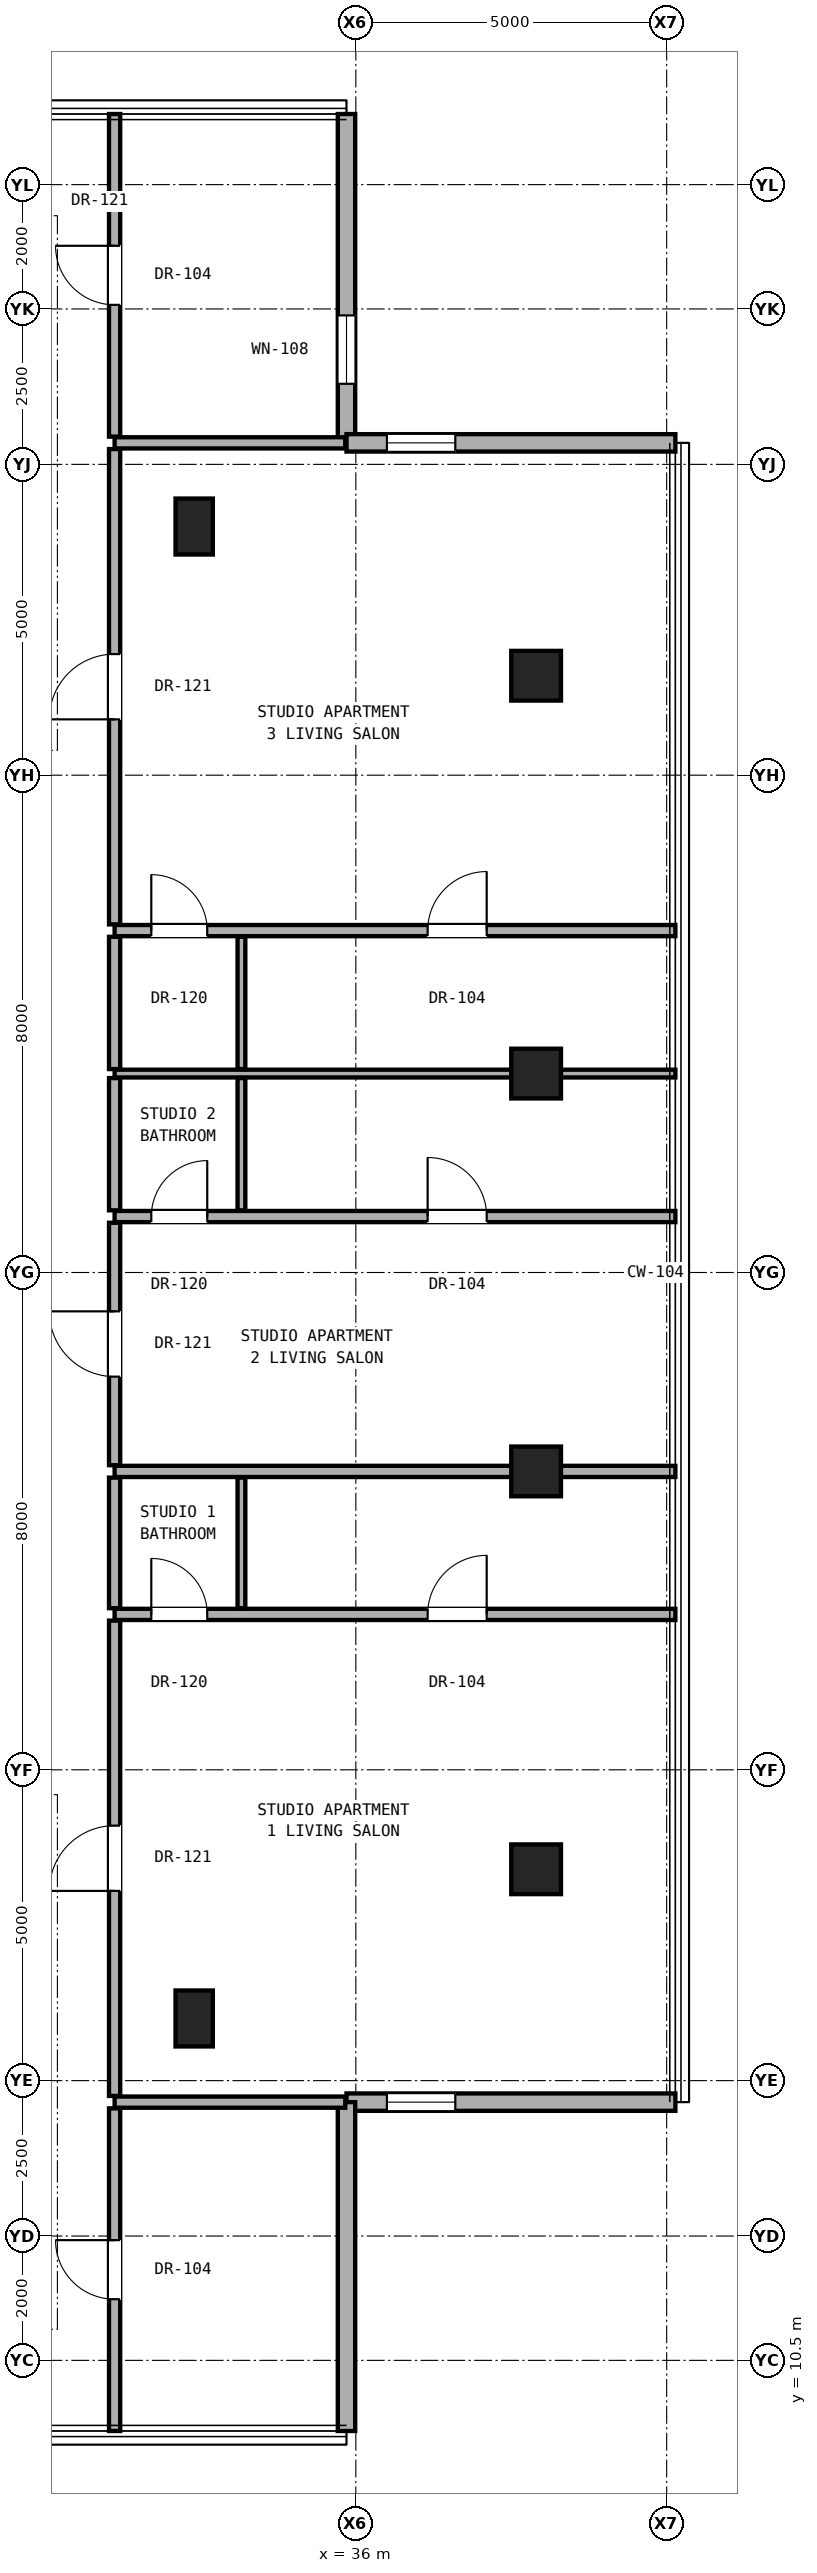
"""IFC4 building model, lengths in metres.
Left out: names, types, materials, properties, quantities, classifications, styles, units other than length and angle.
Written with IfcOpenShell. Run it as: python <this file> out.ifc"""

import sys

from ifc_helpers import new_model, si_unit, direction, frame, frame_2d, origin, origin_2d, place, context, subcontext, project, spatial, rectangle, hollow_rectangle, extrude, element, fill, save


model = new_model("IFC4")
c1 = context("Model", 3, precision=1e-05, world=origin(), true_north=direction((0.0, 1.0)))
c2 = subcontext(c1, "Body", "Model", "MODEL_VIEW")
j1 = project(units=[si_unit("LENGTHUNIT", "METRE"), si_unit("PLANEANGLEUNIT", "RADIAN")], contexts=[c1])
p1 = place(None, origin())
s1 = spatial("IfcSite", under=j1, at=p1, CompositionType="ELEMENT")
p2 = place(p1, origin())
s2 = spatial("IfcBuilding", under=s1, at=p2, CompositionType="ELEMENT")
p3 = place(p2, frame((0.0, 0.0, 226.0)))
s3 = spatial("IfcBuildingStorey", under=s2, at=p3, CompositionType="ELEMENT", Elevation=226.0)
for number, where, z_axis, x_axis in (
    (1, (38.9, 18.4, 0.0), (0.0, 0.0, 1.0), (1.0, 0.0, 0.0)),
    (2, (38.9, 24.8, 0.0), (0.0, 0.0, 1.0), (1.0, 0.0, 0.0)),
    (3, (38.9, 31.2, 0.0), (0.0, 0.0, 1.0), (1.0, 0.0, 0.0)),
    (4, (38.9, 37.6, 0.0), (0.0, 0.0, 1.0), (1.0, 0.0, 0.0)),
):
    element("IfcColumn", number, at=place(p3, frame(where, z_axis=z_axis, x_axis=x_axis)), inside=s3, PredefinedType="COLUMN", context=c2, shape_type="SweptSolid", body=[
        extrude(hollow_rectangle(XDim=0.8, YDim=0.8, WallThickness=0.045, at=origin_2d()), origin(), (0.0, 0.0, 1.0), 3.3),
    ])
for number, where, z_axis, x_axis in (
    (5, (33.4, 16.0, 0.0), (0.0, 0.0, 1.0), (1.0, 0.0, 0.0)),
    (6, (33.4, 40.0, 0.0), (0.0, 0.0, 1.0), (1.0, 0.0, 0.0)),
):
    element("IfcColumn", number, at=place(p3, frame(where, z_axis=z_axis, x_axis=x_axis)), inside=s3, PredefinedType="PILASTER", context=c2, shape_type="SweptSolid", body=[
        extrude(rectangle(XDim=0.6, YDim=0.9, at=origin_2d()), origin(), (0.0, 0.0, 1.0), 3.3),
    ])
p4 = place(p3, frame((35.85, 41.346, 0.0), z_axis=(0.0, 0.0, 1.0), x_axis=(0.0, 1.0, 0.0)))
e7 = element("IfcWall", 7, at=p4, inside=s3, PredefinedType="SOLIDWALL", context=c2, shape_type="SweptSolid", body=[
    extrude(rectangle(XDim=5.29, YDim=0.28, at=frame_2d((2.645, 0.0))), origin(), (0.0, 0.0, 1.0), 3.08),
])
p5 = place(p4, frame((0.95, 0.0, 0.85)))
e8 = element("IfcOpeningElement", 8, at=p5, cuts=e7, PredefinedType="OPENING", context=c2, shape_type="SweptSolid", body=[
    extrude(rectangle(XDim=1.1, YDim=2.0, at=frame_2d((0.55, 1.0))), frame((0.0, 0.15, 0.0), z_axis=(0.0, -1.0, 0.0), x_axis=(1.0, 0.0, 0.0)), (0.0, 0.0, 1.0), 0.3),
])
p6 = place(p3, frame((35.85, 14.654, 0.0), z_axis=(0.0, 0.0, 1.0), x_axis=(1.0, 0.0, 0.0)))
e9 = element("IfcWall", 9, at=p6, inside=s3, PredefinedType="SOLIDWALL", context=c2, shape_type="SweptSolid", body=[
    extrude(rectangle(XDim=5.29, YDim=0.28, at=frame_2d((2.645, 0.0))), origin(), (0.0, 0.0, 1.0), 3.08),
])
p7 = place(p6, frame((0.65, 0.0, 0.85)))
e10 = element("IfcOpeningElement", 10, at=p7, cuts=e9, PredefinedType="OPENING", context=c2, shape_type="SweptSolid", body=[
    extrude(rectangle(XDim=1.1, YDim=2.0, at=frame_2d((0.55, 1.0))), frame((0.0, 0.15, 0.0), z_axis=(0.0, -1.0, 0.0), x_axis=(1.0, 0.0, 0.0)), (0.0, 0.0, 1.0), 0.3),
])
p8 = place(p3, frame((35.85, 9.364, 0.0), z_axis=(0.0, 0.0, 1.0), x_axis=(0.0, 1.0, 0.0)))
e11 = element("IfcWall", 11, at=p8, inside=s3, PredefinedType="SOLIDWALL", context=c2, shape_type="SweptSolid", body=[
    extrude(rectangle(XDim=5.29, YDim=0.28, at=frame_2d((2.645, 0.0))), origin(), (0.0, 0.0, 1.0), 3.08),
])
p9 = place(p3, frame((41.14, 41.346, 0.0), z_axis=(0.0, 0.0, 1.0), x_axis=(-1.0, 0.0, 0.0)))
e12 = element("IfcWall", 12, at=p9, inside=s3, PredefinedType="SOLIDWALL", context=c2, shape_type="SweptSolid", body=[
    extrude(rectangle(XDim=5.29, YDim=0.28, at=frame_2d((2.645, 0.0))), origin(), (0.0, 0.0, 1.0), 3.08),
])
p10 = place(p9, frame((3.54, 0.0, 0.85)))
e13 = element("IfcOpeningElement", 13, at=p10, cuts=e12, PredefinedType="OPENING", context=c2, shape_type="SweptSolid", body=[
    extrude(rectangle(XDim=1.1, YDim=2.0, at=frame_2d((0.55, 1.0))), frame((0.0, 0.15, 0.0), z_axis=(0.0, -1.0, 0.0), x_axis=(1.0, 0.0, 0.0)), (0.0, 0.0, 1.0), 0.3),
])
p11 = place(p3, frame((32.12, 14.654, 0.0), z_axis=(0.0, 0.0, 1.0), x_axis=(1.0, 0.0, 0.0)))
e14 = element("IfcWall", 14, at=p11, inside=s3, PredefinedType="PARTITIONING", context=c2, shape_type="SweptSolid", body=[
    extrude(rectangle(XDim=3.71, YDim=0.18, at=frame_2d((1.855, 0.0))), origin(), (0.0, 0.0, 1.0), 3.1),
])
p12 = place(p3, frame((32.12, 22.5, 0.0), z_axis=(0.0, 0.0, 1.0), x_axis=(1.0, 0.0, 0.0)))
e15 = element("IfcWall", 15, at=p12, inside=s3, PredefinedType="PARTITIONING", context=c2, shape_type="SweptSolid", body=[
    extrude(rectangle(XDim=9.02, YDim=0.18, at=frame_2d((4.51, 0.0))), origin(), (0.0, 0.0, 1.0), 2.319),
])
p13 = place(p12, frame((5.035, 0.0, 0.0)))
e16 = element("IfcOpeningElement", 16, at=p13, cuts=e15, PredefinedType="OPENING", context=c2, shape_type="SweptSolid", body=[
    extrude(rectangle(XDim=0.95, YDim=2.15, at=frame_2d((0.475, 1.075))), frame((0.0, 0.1, 0.0), z_axis=(0.0, -1.0, 0.0), x_axis=(1.0, 0.0, 0.0)), (0.0, 0.0, 1.0), 0.2),
])
p14 = place(p12, frame((0.59, 0.0, 0.0)))
e17 = element("IfcOpeningElement", 17, at=p14, cuts=e15, PredefinedType="OPENING", context=c2, shape_type="SweptSolid", body=[
    extrude(rectangle(XDim=0.9, YDim=2.1, at=frame_2d((0.45, 1.05))), frame((0.0, 0.1, 0.0), z_axis=(0.0, -1.0, 0.0), x_axis=(1.0, 0.0, 0.0)), (0.0, 0.0, 1.0), 0.2),
])
p15 = place(p3, frame((32.12, 24.8, 0.0), z_axis=(0.0, 0.0, 1.0), x_axis=(1.0, 0.0, 0.0)))
e18 = element("IfcWall", 18, at=p15, inside=s3, PredefinedType="PARTITIONING", context=c2, shape_type="SweptSolid", body=[
    extrude(rectangle(XDim=9.02, YDim=0.18, at=frame_2d((4.51, 0.0))), origin(), (0.0, 0.0, 1.0), 2.319),
])
p16 = place(p3, frame((32.12, 28.9, 0.0), z_axis=(0.0, 0.0, 1.0), x_axis=(1.0, 0.0, 0.0)))
e19 = element("IfcWall", 19, at=p16, inside=s3, PredefinedType="PARTITIONING", context=c2, shape_type="SweptSolid", body=[
    extrude(rectangle(XDim=9.02, YDim=0.18, at=frame_2d((4.51, 0.0))), origin(), (0.0, 0.0, 1.0), 2.319),
])
p17 = place(p16, frame((5.035, 0.0, 0.0)))
e20 = element("IfcOpeningElement", 20, at=p17, cuts=e19, PredefinedType="OPENING", context=c2, shape_type="SweptSolid", body=[
    extrude(rectangle(XDim=0.95, YDim=2.15, at=frame_2d((0.475, 1.075))), frame((0.0, 0.1, 0.0), z_axis=(0.0, -1.0, 0.0), x_axis=(1.0, 0.0, 0.0)), (0.0, 0.0, 1.0), 0.2),
])
p18 = place(p16, frame((0.59, 0.0, 0.0)))
e21 = element("IfcOpeningElement", 21, at=p18, cuts=e19, PredefinedType="OPENING", context=c2, shape_type="SweptSolid", body=[
    extrude(rectangle(XDim=0.9, YDim=2.1, at=frame_2d((0.45, 1.05))), frame((0.0, 0.1, 0.0), z_axis=(0.0, -1.0, 0.0), x_axis=(1.0, 0.0, 0.0)), (0.0, 0.0, 1.0), 0.2),
])
p19 = place(p3, frame((32.12, 31.2, 0.0), z_axis=(0.0, 0.0, 1.0), x_axis=(1.0, 0.0, 0.0)))
e22 = element("IfcWall", 22, at=p19, inside=s3, PredefinedType="PARTITIONING", context=c2, shape_type="SweptSolid", body=[
    extrude(rectangle(XDim=9.02, YDim=0.125, at=frame_2d((4.51, 0.0))), origin(), (0.0, 0.0, 1.0), 2.319),
])
p20 = place(p3, frame((32.12, 33.5, 0.0), z_axis=(0.0, 0.0, 1.0), x_axis=(1.0, 0.0, 0.0)))
e23 = element("IfcWall", 23, at=p20, inside=s3, PredefinedType="PARTITIONING", context=c2, shape_type="SweptSolid", body=[
    extrude(rectangle(XDim=9.02, YDim=0.18, at=frame_2d((4.51, 0.0))), origin(), (0.0, 0.0, 1.0), 2.319),
])
p21 = place(p20, frame((5.035, 0.0, 0.0)))
e24 = element("IfcOpeningElement", 24, at=p21, cuts=e23, PredefinedType="OPENING", context=c2, shape_type="SweptSolid", body=[
    extrude(rectangle(XDim=0.95, YDim=2.15, at=frame_2d((0.475, 1.075))), frame((0.0, 0.1, 0.0), z_axis=(0.0, -1.0, 0.0), x_axis=(1.0, 0.0, 0.0)), (0.0, 0.0, 1.0), 0.2),
])
p22 = place(p20, frame((0.59, 0.0, 0.0)))
e25 = element("IfcOpeningElement", 25, at=p22, cuts=e23, PredefinedType="OPENING", context=c2, shape_type="SweptSolid", body=[
    extrude(rectangle(XDim=0.9, YDim=2.1, at=frame_2d((0.45, 1.05))), frame((0.0, 0.1, 0.0), z_axis=(0.0, -1.0, 0.0), x_axis=(1.0, 0.0, 0.0)), (0.0, 0.0, 1.0), 0.2),
])
p23 = place(p3, frame((32.12, 41.346, 0.0), z_axis=(0.0, 0.0, 1.0), x_axis=(1.0, 0.0, 0.0)))
e26 = element("IfcWall", 26, at=p23, inside=s3, PredefinedType="PARTITIONING", context=c2, shape_type="SweptSolid", body=[
    extrude(rectangle(XDim=3.71, YDim=0.18, at=frame_2d((1.855, 0.0))), origin(), (0.0, 0.0, 1.0), 3.1),
])
p24 = place(p3, frame((32.12, 9.364, 0.0), z_axis=(0.0, 0.0, 1.0), x_axis=(0.0, 1.0, 0.0)))
e27 = element("IfcWall", 27, at=p24, inside=s3, PredefinedType="PARTITIONING", context=c2, shape_type="SweptSolid", body=[
    extrude(rectangle(XDim=5.19, YDim=0.18, at=frame_2d((2.595, 0.0))), origin(), (0.0, 0.0, 1.0), 3.1),
])
p25 = place(p24, frame((2.12, 0.0, 0.0)))
e28 = element("IfcOpeningElement", 28, at=p25, cuts=e27, PredefinedType="OPENING", context=c2, shape_type="SweptSolid", body=[
    extrude(rectangle(XDim=0.95, YDim=2.15, at=frame_2d((0.475, 1.075))), frame((0.0, 0.1, 0.0), z_axis=(0.0, -1.0, 0.0), x_axis=(1.0, 0.0, 0.0)), (0.0, 0.0, 1.0), 0.2),
])
p26 = place(p3, frame((32.12, 14.754, 0.0), z_axis=(0.0, 0.0, 1.0), x_axis=(0.0, 1.0, 0.0)))
e29 = element("IfcWall", 29, at=p26, inside=s3, PredefinedType="PARTITIONING", context=c2, shape_type="SweptSolid", body=[
    extrude(rectangle(XDim=7.646, YDim=0.18, at=frame_2d((3.823, 0.0))), origin(), (0.0, 0.0, 1.0), 2.492),
])
p27 = place(p26, frame((3.298, 0.0, 0.0)))
e30 = element("IfcOpeningElement", 30, at=p27, cuts=e29, PredefinedType="OPENING", context=c2, shape_type="SweptSolid", body=[
    extrude(rectangle(XDim=1.05, YDim=2.2, at=frame_2d((0.525, 1.1))), frame((0.0, 0.1, 0.0), z_axis=(0.0, -1.0, 0.0), x_axis=(1.0, 0.0, 0.0)), (0.0, 0.0, 1.0), 0.2),
])
p28 = place(p3, frame((32.12, 22.6, 0.0), z_axis=(0.0, 0.0, 1.0), x_axis=(0.0, 1.0, 0.0)))
e31 = element("IfcWall", 31, at=p28, inside=s3, PredefinedType="PARTITIONING", context=c2, shape_type="SweptSolid", body=[
    extrude(rectangle(XDim=2.1, YDim=0.18, at=frame_2d((1.05, 0.0))), origin(), (0.0, 0.0, 1.0), 2.396),
])
p29 = place(p3, frame((32.12, 24.9, 0.0), z_axis=(0.0, 0.0, 1.0), x_axis=(0.0, 1.0, 0.0)))
e32 = element("IfcWall", 32, at=p29, inside=s3, PredefinedType="PARTITIONING", context=c2, shape_type="SweptSolid", body=[
    extrude(rectangle(XDim=3.9, YDim=0.18, at=frame_2d((1.95, 0.0))), origin(), (0.0, 0.0, 1.0), 2.396),
])
p30 = place(p29, frame((1.425, 0.0, 0.0)))
e33 = element("IfcOpeningElement", 33, at=p30, cuts=e32, PredefinedType="OPENING", context=c2, shape_type="SweptSolid", body=[
    extrude(rectangle(XDim=1.05, YDim=2.2, at=frame_2d((0.525, 1.1))), frame((0.0, 0.1, 0.0), z_axis=(0.0, -1.0, 0.0), x_axis=(1.0, 0.0, 0.0)), (0.0, 0.0, 1.0), 0.2),
])
for number, where, z_axis, x_axis in (
    (34, (32.12, 29.0, 0.0), (0.0, 0.0, 1.0), (0.0, 1.0, 0.0)),
    (35, (32.12, 31.272, 0.0), (0.0, 0.0, 1.0), (0.0, 1.0, 0.0)),
):
    element("IfcWall", number, at=place(p3, frame(where, z_axis=z_axis, x_axis=x_axis)), inside=s3, PredefinedType="PARTITIONING", context=c2, shape_type="SweptSolid", body=[
        extrude(rectangle(XDim=2.127, YDim=0.18, at=frame_2d((1.064, 0.0))), origin(), (0.0, 0.0, 1.0), 2.396),
    ])
p31 = place(p3, frame((32.12, 33.6, 0.0), z_axis=(0.0, 0.0, 1.0), x_axis=(0.0, 1.0, 0.0)))
e36 = element("IfcWall", 36, at=p31, inside=s3, PredefinedType="PARTITIONING", context=c2, shape_type="SweptSolid", body=[
    extrude(rectangle(XDim=7.646, YDim=0.18, at=frame_2d((3.823, 0.0))), origin(), (0.0, 0.0, 1.0), 2.492),
])
p32 = place(p31, frame((3.298, 0.0, 0.0)))
e37 = element("IfcOpeningElement", 37, at=p32, cuts=e36, PredefinedType="OPENING", context=c2, shape_type="SweptSolid", body=[
    extrude(rectangle(XDim=1.05, YDim=2.2, at=frame_2d((0.525, 1.1))), frame((0.0, 0.1, 0.0), z_axis=(0.0, -1.0, 0.0), x_axis=(1.0, 0.0, 0.0)), (0.0, 0.0, 1.0), 0.2),
])
p33 = place(p3, frame((32.12, 41.446, 0.0), z_axis=(0.0, 0.0, 1.0), x_axis=(0.0, 1.0, 0.0)))
e38 = element("IfcWall", 38, at=p33, inside=s3, PredefinedType="PARTITIONING", context=c2, shape_type="SweptSolid", body=[
    extrude(rectangle(XDim=5.19, YDim=0.18, at=frame_2d((2.595, 0.0))), origin(), (0.0, 0.0, 1.0), 3.1),
])
p34 = place(p33, frame((2.12, 0.0, 0.0)))
e39 = element("IfcOpeningElement", 39, at=p34, cuts=e38, PredefinedType="OPENING", context=c2, shape_type="SweptSolid", body=[
    extrude(rectangle(XDim=0.95, YDim=2.15, at=frame_2d((0.475, 1.075))), frame((0.0, 0.1, 0.0), z_axis=(0.0, -1.0, 0.0), x_axis=(1.0, 0.0, 0.0)), (0.0, 0.0, 1.0), 0.2),
])
p35 = place(p3, frame((34.16, 22.6, 0.0), z_axis=(0.0, 0.0, 1.0), x_axis=(0.0, 1.0, 0.0)))
e40 = element("IfcWall", 40, at=p35, inside=s3, PredefinedType="PARTITIONING", context=c2, shape_type="SweptSolid", body=[
    extrude(rectangle(XDim=2.1, YDim=0.125, at=frame_2d((1.05, 0.0))), origin(), (0.0, 0.0, 1.0), 2.396),
])
for number, where, z_axis, x_axis in (
    (41, (34.16, 29.0, 0.0), (0.0, 0.0, 1.0), (0.0, 1.0, 0.0)),
    (42, (34.16, 31.272, 0.0), (0.0, 0.0, 1.0), (0.0, 1.0, 0.0)),
):
    element("IfcWall", number, at=place(p3, frame(where, z_axis=z_axis, x_axis=x_axis)), inside=s3, PredefinedType="PARTITIONING", context=c2, shape_type="SweptSolid", body=[
        extrude(rectangle(XDim=2.127, YDim=0.125, at=frame_2d((1.064, 0.0))), origin(), (0.0, 0.0, 1.0), 2.396),
    ])
p36 = place(p5, origin())
e43 = element("IfcWindow", 43, at=p36, inside=s3, PartitioningType="SINGLE_PANEL", PredefinedType="WINDOW", context=c2, shape_type="SweptSolid", body=[
    extrude(rectangle(XDim=1.1, YDim=2.0, at=frame_2d((0.55, 1.0))), frame((0.0, 0.03, 0.0), z_axis=(0.0, -1.0, 0.0), x_axis=(1.0, 0.0, 0.0)), (0.0, 0.0, 1.0), 0.06),
])
fill(e8, e43)
p37 = place(p7, origin())
e44 = element("IfcWindow", 44, at=p37, inside=s3, PartitioningType="SINGLE_PANEL", PredefinedType="WINDOW", context=c2, shape_type="SweptSolid", body=[
    extrude(rectangle(XDim=1.1, YDim=2.0, at=frame_2d((0.55, 1.0))), frame((0.0, 0.03, 0.0), z_axis=(0.0, -1.0, 0.0), x_axis=(1.0, 0.0, 0.0)), (0.0, 0.0, 1.0), 0.06),
])
fill(e10, e44)
p38 = place(p10, origin())
e45 = element("IfcWindow", 45, at=p38, inside=s3, PartitioningType="SINGLE_PANEL", PredefinedType="WINDOW", context=c2, shape_type="SweptSolid", body=[
    extrude(rectangle(XDim=1.1, YDim=2.0, at=frame_2d((0.55, 1.0))), frame((0.0, 0.03, 0.0), z_axis=(0.0, -1.0, 0.0), x_axis=(1.0, 0.0, 0.0)), (0.0, 0.0, 1.0), 0.06),
])
fill(e13, e45)
p39 = place(p27, origin())
e46 = element("IfcDoor", 46, at=p39, inside=s3, OperationType="SINGLE_SWING_LEFT", PredefinedType="DOOR", context=c2, shape_type="SweptSolid", body=[
    extrude(rectangle(XDim=1.05, YDim=2.2, at=frame_2d((0.525, 1.1))), frame((0.0, 0.025, 0.0), z_axis=(0.0, -1.0, 0.0), x_axis=(1.0, 0.0, 0.0)), (0.0, 0.0, 1.0), 0.05),
])
fill(e30, e46)
p40 = place(p13, origin())
e47 = element("IfcDoor", 47, at=p40, inside=s3, OperationType="SINGLE_SWING_RIGHT", PredefinedType="DOOR", context=c2, shape_type="SweptSolid", body=[
    extrude(rectangle(XDim=0.95, YDim=2.15, at=frame_2d((0.475, 1.075))), frame((0.0, 0.025, 0.0), z_axis=(0.0, -1.0, 0.0), x_axis=(1.0, 0.0, 0.0)), (0.0, 0.0, 1.0), 0.05),
])
fill(e16, e47)
p41 = place(p14, origin())
e48 = element("IfcDoor", 48, at=p41, inside=s3, OperationType="SINGLE_SWING_LEFT", PredefinedType="DOOR", context=c2, shape_type="SweptSolid", body=[
    extrude(rectangle(XDim=0.9, YDim=2.1, at=frame_2d((0.45, 1.05))), frame((0.0, 0.025, 0.0), z_axis=(0.0, -1.0, 0.0), x_axis=(1.0, 0.0, 0.0)), (0.0, 0.0, 1.0), 0.05),
])
fill(e17, e48)
p42 = place(p30, origin())
e49 = element("IfcDoor", 49, at=p42, inside=s3, OperationType="SINGLE_SWING_RIGHT", PredefinedType="DOOR", context=c2, shape_type="SweptSolid", body=[
    extrude(rectangle(XDim=1.05, YDim=2.2, at=frame_2d((0.525, 1.1))), frame((0.0, 0.025, 0.0), z_axis=(0.0, -1.0, 0.0), x_axis=(1.0, 0.0, 0.0)), (0.0, 0.0, 1.0), 0.05),
])
fill(e33, e49)
p43 = place(p17, origin())
e50 = element("IfcDoor", 50, at=p43, inside=s3, OperationType="SINGLE_SWING_LEFT", PredefinedType="DOOR", context=c2, shape_type="SweptSolid", body=[
    extrude(rectangle(XDim=0.95, YDim=2.15, at=frame_2d((0.475, 1.075))), frame((0.0, 0.025, 0.0), z_axis=(0.0, -1.0, 0.0), x_axis=(1.0, 0.0, 0.0)), (0.0, 0.0, 1.0), 0.05),
])
fill(e20, e50)
p44 = place(p18, origin())
e51 = element("IfcDoor", 51, at=p44, inside=s3, OperationType="SINGLE_SWING_RIGHT", PredefinedType="DOOR", context=c2, shape_type="SweptSolid", body=[
    extrude(rectangle(XDim=0.9, YDim=2.1, at=frame_2d((0.45, 1.05))), frame((0.0, 0.025, 0.0), z_axis=(0.0, -1.0, 0.0), x_axis=(1.0, 0.0, 0.0)), (0.0, 0.0, 1.0), 0.05),
])
fill(e21, e51)
p45 = place(p32, origin())
e52 = element("IfcDoor", 52, at=p45, inside=s3, OperationType="SINGLE_SWING_LEFT", PredefinedType="DOOR", context=c2, shape_type="SweptSolid", body=[
    extrude(rectangle(XDim=1.05, YDim=2.2, at=frame_2d((0.525, 1.1))), frame((0.0, 0.025, 0.0), z_axis=(0.0, -1.0, 0.0), x_axis=(1.0, 0.0, 0.0)), (0.0, 0.0, 1.0), 0.05),
])
fill(e37, e52)
p46 = place(p21, origin())
e53 = element("IfcDoor", 53, at=p46, inside=s3, OperationType="SINGLE_SWING_RIGHT", PredefinedType="DOOR", context=c2, shape_type="SweptSolid", body=[
    extrude(rectangle(XDim=0.95, YDim=2.15, at=frame_2d((0.475, 1.075))), frame((0.0, 0.025, 0.0), z_axis=(0.0, -1.0, 0.0), x_axis=(1.0, 0.0, 0.0)), (0.0, 0.0, 1.0), 0.05),
])
fill(e24, e53)
p47 = place(p22, origin())
e54 = element("IfcDoor", 54, at=p47, inside=s3, OperationType="SINGLE_SWING_LEFT", PredefinedType="DOOR", context=c2, shape_type="SweptSolid", body=[
    extrude(rectangle(XDim=0.9, YDim=2.1, at=frame_2d((0.45, 1.05))), frame((0.0, 0.025, 0.0), z_axis=(0.0, -1.0, 0.0), x_axis=(1.0, 0.0, 0.0)), (0.0, 0.0, 1.0), 0.05),
])
fill(e25, e54)
p48 = place(p25, origin())
e55 = element("IfcDoor", 55, at=p48, inside=s3, OperationType="SINGLE_SWING_RIGHT", PredefinedType="DOOR", context=c2, shape_type="SweptSolid", body=[
    extrude(rectangle(XDim=0.95, YDim=2.15, at=frame_2d((0.475, 1.075))), frame((0.0, 0.025, 0.0), z_axis=(0.0, -1.0, 0.0), x_axis=(1.0, 0.0, 0.0)), (0.0, 0.0, 1.0), 0.05),
])
fill(e28, e55)
p49 = place(p34, origin())
e56 = element("IfcDoor", 56, at=p49, inside=s3, OperationType="SINGLE_SWING_RIGHT", PredefinedType="DOOR", context=c2, shape_type="SweptSolid", body=[
    extrude(rectangle(XDim=0.95, YDim=2.15, at=frame_2d((0.475, 1.075))), frame((0.0, 0.025, 0.0), z_axis=(0.0, -1.0, 0.0), x_axis=(1.0, 0.0, 0.0)), (0.0, 0.0, 1.0), 0.05),
])
fill(e39, e56)
save(model, sys.argv[1])
